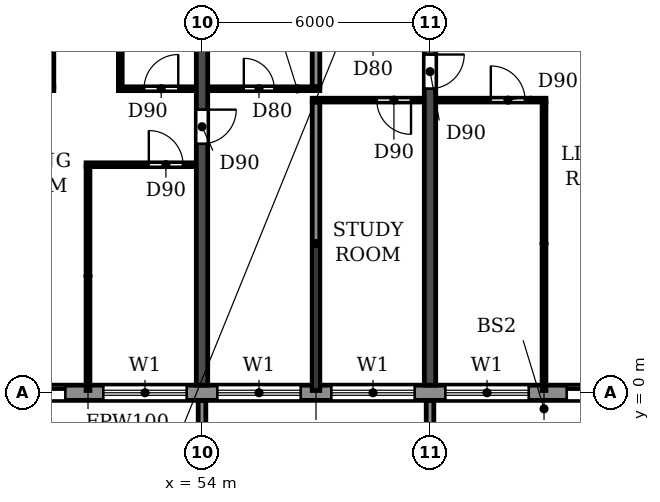
"""IFC4 building model, lengths in metres.
Left out: names, types, materials, properties, quantities, classifications, styles, units other than length and angle.
Written with IfcOpenShell. Run it as: python <this file> out.ifc"""

import sys

from ifc_helpers import new_model, si_unit, direction, frame, frame_2d, origin, place, context, subcontext, project, spatial, polyline, rectangle, outline, extrude, source, transform, mapped, element, fill, save


model = new_model("IFC4")
c1 = context("Model", 3, precision=1e-05, world=origin(), true_north=direction((0.0, 1.0)))
c2 = subcontext(c1, "Body", "Model", "MODEL_VIEW")
j1 = project(units=[si_unit("LENGTHUNIT", "METRE"), si_unit("PLANEANGLEUNIT", "RADIAN")], contexts=[c1])
p1 = place(None, origin())
s1 = spatial("IfcSite", under=j1, at=p1, CompositionType="ELEMENT")
p2 = place(p1, origin())
s2 = spatial("IfcBuilding", under=s1, at=p2, CompositionType="ELEMENT")
p3 = place(p2, frame((0.0, 0.0, 152.1)))
s3 = spatial("IfcBuildingStorey", under=s2, at=p3, CompositionType="ELEMENT", Elevation=152.1)
p4 = place(p3, frame((54.0, 0.2, 0.0), z_axis=(0.0, 0.0, 1.0), x_axis=(0.0, 1.0, 0.0)))
e1 = element("IfcWall", 1, at=p4, inside=s3, PredefinedType="SHEAR", context=c2, shape_type="SweptSolid", body=[
    extrude(rectangle(XDim=11.675, YDim=0.3, at=frame_2d((5.837, 0.0))), origin(), (0.0, 0.0, 1.0), 3.07),
])
p5 = place(p4, frame((6.35, 0.0, 0.0)))
e2 = element("IfcOpeningElement", 2, at=p5, cuts=e1, PredefinedType="OPENING", context=c2, shape_type="SweptSolid", body=[
    extrude(rectangle(XDim=0.9, YDim=2.1, at=frame_2d((0.45, 1.05))), frame((0.0, 0.16, 0.0), z_axis=(0.0, -1.0, 0.0), x_axis=(1.0, 0.0, 0.0)), (0.0, 0.0, 1.0), 0.32),
])
p6 = place(p3, frame((60.0, 0.2, 0.0), z_axis=(0.0, 0.0, 1.0), x_axis=(0.0, 1.0, 0.0)))
e3 = element("IfcWall", 3, at=p6, inside=s3, PredefinedType="SHEAR", context=c2, shape_type="SweptSolid", body=[
    extrude(rectangle(XDim=11.675, YDim=0.3, at=frame_2d((5.837, 0.0))), origin(), (0.0, 0.0, 1.0), 3.07),
])
p7 = place(p6, frame((7.8, 0.0, 0.0)))
e4 = element("IfcOpeningElement", 4, at=p7, cuts=e3, PredefinedType="OPENING", context=c2, shape_type="SweptSolid", body=[
    extrude(rectangle(XDim=0.9, YDim=2.1, at=frame_2d((0.45, 1.05))), frame((0.0, 0.16, 0.0), z_axis=(0.0, -1.0, 0.0), x_axis=(1.0, 0.0, 0.0)), (0.0, 0.0, 1.0), 0.32),
])
p8 = place(p3, frame((16.683, 0.0, 0.0), z_axis=(0.0, 0.0, 1.0), x_axis=(1.0, 0.0, 0.0)))
e5 = element("IfcWall", 5, at=p8, inside=s3, PredefinedType="STANDARD", context=c2, shape_type="SweptSolid", body=[
    extrude(rectangle(XDim=68.634, YDim=0.4, at=frame_2d((34.317, 0.0))), origin(), (0.0, 0.0, 1.0), 3.07),
])
p9 = place(p8, frame((1.717, 0.0, 0.9)))
e6 = element("IfcOpeningElement", 6, at=p9, cuts=e5, PredefinedType="OPENING", context=c2, shape_type="SweptSolid", body=[
    extrude(rectangle(XDim=2.2, YDim=1.5, at=frame_2d((1.1, 0.75))), frame((0.0, 0.21, 0.0), z_axis=(0.0, -1.0, 0.0), x_axis=(1.0, 0.0, 0.0)), (0.0, 0.0, 1.0), 0.42),
])
p10 = place(p8, frame((4.717, 0.0, 0.9)))
e7 = element("IfcOpeningElement", 7, at=p10, cuts=e5, PredefinedType="OPENING", context=c2, shape_type="SweptSolid", body=[
    extrude(rectangle(XDim=2.2, YDim=1.5, at=frame_2d((1.1, 0.75))), frame((0.0, 0.21, 0.0), z_axis=(0.0, -1.0, 0.0), x_axis=(1.0, 0.0, 0.0)), (0.0, 0.0, 1.0), 0.42),
])
p11 = place(p8, frame((7.917, 0.0, 0.0)))
e8 = element("IfcOpeningElement", 8, at=p11, cuts=e5, PredefinedType="OPENING", context=c2, shape_type="SweptSolid", body=[
    extrude(rectangle(XDim=1.8, YDim=2.4, at=frame_2d((0.9, 1.2))), frame((0.0, 0.21, 0.0), z_axis=(0.0, -1.0, 0.0), x_axis=(1.0, 0.0, 0.0)), (0.0, 0.0, 1.0), 0.42),
])
p12 = place(p8, frame((10.717, 0.0, 0.9)))
e9 = element("IfcOpeningElement", 9, at=p12, cuts=e5, PredefinedType="OPENING", context=c2, shape_type="SweptSolid", body=[
    extrude(rectangle(XDim=2.2, YDim=1.5, at=frame_2d((1.1, 0.75))), frame((0.0, 0.21, 0.0), z_axis=(0.0, -1.0, 0.0), x_axis=(1.0, 0.0, 0.0)), (0.0, 0.0, 1.0), 0.42),
])
p13 = place(p8, frame((13.717, 0.0, 0.9)))
e10 = element("IfcOpeningElement", 10, at=p13, cuts=e5, PredefinedType="OPENING", context=c2, shape_type="SweptSolid", body=[
    extrude(rectangle(XDim=2.2, YDim=1.5, at=frame_2d((1.1, 0.75))), frame((0.0, 0.21, 0.0), z_axis=(0.0, -1.0, 0.0), x_axis=(1.0, 0.0, 0.0)), (0.0, 0.0, 1.0), 0.42),
])
p14 = place(p8, frame((16.717, 0.0, 0.9)))
e11 = element("IfcOpeningElement", 11, at=p14, cuts=e5, PredefinedType="OPENING", context=c2, shape_type="SweptSolid", body=[
    extrude(rectangle(XDim=2.2, YDim=1.5, at=frame_2d((1.1, 0.75))), frame((0.0, 0.21, 0.0), z_axis=(0.0, -1.0, 0.0), x_axis=(1.0, 0.0, 0.0)), (0.0, 0.0, 1.0), 0.42),
])
p15 = place(p8, frame((19.717, 0.0, 0.9)))
e12 = element("IfcOpeningElement", 12, at=p15, cuts=e5, PredefinedType="OPENING", context=c2, shape_type="SweptSolid", body=[
    extrude(rectangle(XDim=2.2, YDim=1.5, at=frame_2d((1.1, 0.75))), frame((0.0, 0.21, 0.0), z_axis=(0.0, -1.0, 0.0), x_axis=(1.0, 0.0, 0.0)), (0.0, 0.0, 1.0), 0.42),
])
p16 = place(p8, frame((22.917, 0.0, 0.0)))
e13 = element("IfcOpeningElement", 13, at=p16, cuts=e5, PredefinedType="OPENING", context=c2, shape_type="SweptSolid", body=[
    extrude(rectangle(XDim=1.8, YDim=2.4, at=frame_2d((0.9, 1.2))), frame((0.0, 0.21, 0.0), z_axis=(0.0, -1.0, 0.0), x_axis=(1.0, 0.0, 0.0)), (0.0, 0.0, 1.0), 0.42),
])
p17 = place(p8, frame((25.717, 0.0, 0.9)))
e14 = element("IfcOpeningElement", 14, at=p17, cuts=e5, PredefinedType="OPENING", context=c2, shape_type="SweptSolid", body=[
    extrude(rectangle(XDim=2.2, YDim=1.5, at=frame_2d((1.1, 0.75))), frame((0.0, 0.21, 0.0), z_axis=(0.0, -1.0, 0.0), x_axis=(1.0, 0.0, 0.0)), (0.0, 0.0, 1.0), 0.42),
])
p18 = place(p8, frame((28.717, 0.0, 0.9)))
e15 = element("IfcOpeningElement", 15, at=p18, cuts=e5, PredefinedType="OPENING", context=c2, shape_type="SweptSolid", body=[
    extrude(rectangle(XDim=2.2, YDim=1.5, at=frame_2d((1.1, 0.75))), frame((0.0, 0.21, 0.0), z_axis=(0.0, -1.0, 0.0), x_axis=(1.0, 0.0, 0.0)), (0.0, 0.0, 1.0), 0.42),
])
p19 = place(p8, frame((31.917, 0.0, 0.0)))
e16 = element("IfcOpeningElement", 16, at=p19, cuts=e5, PredefinedType="OPENING", context=c2, shape_type="SweptSolid", body=[
    extrude(rectangle(XDim=1.8, YDim=2.4, at=frame_2d((0.9, 1.2))), frame((0.0, 0.21, 0.0), z_axis=(0.0, -1.0, 0.0), x_axis=(1.0, 0.0, 0.0)), (0.0, 0.0, 1.0), 0.42),
])
p20 = place(p8, frame((34.717, 0.0, 0.9)))
e17 = element("IfcOpeningElement", 17, at=p20, cuts=e5, PredefinedType="OPENING", context=c2, shape_type="SweptSolid", body=[
    extrude(rectangle(XDim=2.2, YDim=1.5, at=frame_2d((1.1, 0.75))), frame((0.0, 0.21, 0.0), z_axis=(0.0, -1.0, 0.0), x_axis=(1.0, 0.0, 0.0)), (0.0, 0.0, 1.0), 0.42),
])
p21 = place(p8, frame((37.717, 0.0, 0.9)))
e18 = element("IfcOpeningElement", 18, at=p21, cuts=e5, PredefinedType="OPENING", context=c2, shape_type="SweptSolid", body=[
    extrude(rectangle(XDim=2.2, YDim=1.5, at=frame_2d((1.1, 0.75))), frame((0.0, 0.21, 0.0), z_axis=(0.0, -1.0, 0.0), x_axis=(1.0, 0.0, 0.0)), (0.0, 0.0, 1.0), 0.42),
])
p22 = place(p8, frame((40.717, 0.0, 0.9)))
e19 = element("IfcOpeningElement", 19, at=p22, cuts=e5, PredefinedType="OPENING", context=c2, shape_type="SweptSolid", body=[
    extrude(rectangle(XDim=2.2, YDim=1.5, at=frame_2d((1.1, 0.75))), frame((0.0, 0.21, 0.0), z_axis=(0.0, -1.0, 0.0), x_axis=(1.0, 0.0, 0.0)), (0.0, 0.0, 1.0), 0.42),
])
p23 = place(p8, frame((43.717, 0.0, 0.9)))
e20 = element("IfcOpeningElement", 20, at=p23, cuts=e5, PredefinedType="OPENING", context=c2, shape_type="SweptSolid", body=[
    extrude(rectangle(XDim=2.2, YDim=1.5, at=frame_2d((1.1, 0.75))), frame((0.0, 0.21, 0.0), z_axis=(0.0, -1.0, 0.0), x_axis=(1.0, 0.0, 0.0)), (0.0, 0.0, 1.0), 0.42),
])
p24 = place(p8, frame((46.917, 0.0, 0.0)))
e21 = element("IfcOpeningElement", 21, at=p24, cuts=e5, PredefinedType="OPENING", context=c2, shape_type="SweptSolid", body=[
    extrude(rectangle(XDim=1.8, YDim=2.4, at=frame_2d((0.9, 1.2))), frame((0.0, 0.21, 0.0), z_axis=(0.0, -1.0, 0.0), x_axis=(1.0, 0.0, 0.0)), (0.0, 0.0, 1.0), 0.42),
])
p25 = place(p8, frame((49.717, 0.0, 0.9)))
e22 = element("IfcOpeningElement", 22, at=p25, cuts=e5, PredefinedType="OPENING", context=c2, shape_type="SweptSolid", body=[
    extrude(rectangle(XDim=2.2, YDim=1.5, at=frame_2d((1.1, 0.75))), frame((0.0, 0.21, 0.0), z_axis=(0.0, -1.0, 0.0), x_axis=(1.0, 0.0, 0.0)), (0.0, 0.0, 1.0), 0.42),
])
p26 = place(p8, frame((52.717, 0.0, 0.9)))
e23 = element("IfcOpeningElement", 23, at=p26, cuts=e5, PredefinedType="OPENING", context=c2, shape_type="SweptSolid", body=[
    extrude(rectangle(XDim=2.2, YDim=1.5, at=frame_2d((1.1, 0.75))), frame((0.0, 0.21, 0.0), z_axis=(0.0, -1.0, 0.0), x_axis=(1.0, 0.0, 0.0)), (0.0, 0.0, 1.0), 0.42),
])
p27 = place(p8, frame((55.717, 0.0, 0.9)))
e24 = element("IfcOpeningElement", 24, at=p27, cuts=e5, PredefinedType="OPENING", context=c2, shape_type="SweptSolid", body=[
    extrude(rectangle(XDim=2.2, YDim=1.5, at=frame_2d((1.1, 0.75))), frame((0.0, 0.21, 0.0), z_axis=(0.0, -1.0, 0.0), x_axis=(1.0, 0.0, 0.0)), (0.0, 0.0, 1.0), 0.42),
])
p28 = place(p8, frame((58.917, 0.0, 0.0)))
e25 = element("IfcOpeningElement", 25, at=p28, cuts=e5, PredefinedType="OPENING", context=c2, shape_type="SweptSolid", body=[
    extrude(rectangle(XDim=1.8, YDim=2.4, at=frame_2d((0.9, 1.2))), frame((0.0, 0.21, 0.0), z_axis=(0.0, -1.0, 0.0), x_axis=(1.0, 0.0, 0.0)), (0.0, 0.0, 1.0), 0.42),
])
p29 = place(p8, frame((61.717, 0.0, 0.9)))
e26 = element("IfcOpeningElement", 26, at=p29, cuts=e5, PredefinedType="OPENING", context=c2, shape_type="SweptSolid", body=[
    extrude(rectangle(XDim=2.2, YDim=1.5, at=frame_2d((1.1, 0.75))), frame((0.0, 0.21, 0.0), z_axis=(0.0, -1.0, 0.0), x_axis=(1.0, 0.0, 0.0)), (0.0, 0.0, 1.0), 0.42),
])
p30 = place(p8, frame((64.717, 0.0, 0.9)))
e27 = element("IfcOpeningElement", 27, at=p30, cuts=e5, PredefinedType="OPENING", context=c2, shape_type="SweptSolid", body=[
    extrude(rectangle(XDim=2.2, YDim=1.5, at=frame_2d((1.1, 0.75))), frame((0.0, 0.21, 0.0), z_axis=(0.0, -1.0, 0.0), x_axis=(1.0, 0.0, 0.0)), (0.0, 0.0, 1.0), 0.42),
])
m1 = source(origin(), c2, "Body", "SweptSolid", [
    extrude(outline(polyline([(0.0, 0.0), (0.2, 0.0), (0.2, 1.65), (0.0, 1.65), (0.0, 0.0)])), origin(), (0.0, 0.0, 1.0), 3.1),
])
for number, where in (
    (28, (53.9, -1.85, 0.0)),
    (29, (59.9, -1.85, 0.0)),
):
    element("IfcWall", number, at=place(p3, frame(where)), inside=s3, PredefinedType="STANDARD", context=c2, shape_type="MappedRepresentation", body=[
        mapped(m1, transform((0.0, 0.0, 0.0))),
    ])
p31 = place(p3, frame((57.0, 0.06, 0.0), z_axis=(0.0, 0.0, 1.0), x_axis=(0.0, 1.0, 0.0)))
e30 = element("IfcWall", 30, at=p31, inside=s3, PredefinedType="PARTITIONING", context=c2, shape_type="SweptSolid", body=[
    extrude(rectangle(XDim=7.59, YDim=0.2, at=frame_2d((3.795, 0.0))), origin(), (0.0, 0.0, 1.0), 3.07),
])
p32 = place(p3, frame((57.0, 8.05, 0.0), z_axis=(0.0, 0.0, 1.0), x_axis=(0.0, 1.0, 0.0)))
e31 = element("IfcWall", 31, at=p32, inside=s3, PredefinedType="PARTITIONING", context=c2, shape_type="SweptSolid", body=[
    extrude(rectangle(XDim=3.815, YDim=0.2, at=frame_2d((1.907, 0.0))), origin(), (0.0, 0.0, 1.0), 3.07),
])
p33 = place(p3, frame((50.95, 6.0, 0.0), z_axis=(0.0, 0.0, 1.0), x_axis=(1.0, 0.0, 0.0)))
e32 = element("IfcWall", 32, at=p33, inside=s3, PredefinedType="PARTITIONING", context=c2, shape_type="SweptSolid", body=[
    extrude(rectangle(XDim=2.89, YDim=0.1, at=frame_2d((1.445, 0.0))), origin(), (0.0, 0.0, 1.0), 3.07),
])
p34 = place(p33, frame((1.65, 0.0, 0.0)))
e33 = element("IfcOpeningElement", 33, at=p34, cuts=e32, PredefinedType="OPENING", context=c2, shape_type="SweptSolid", body=[
    extrude(rectangle(XDim=0.9, YDim=2.1, at=frame_2d((0.45, 1.05))), frame((0.0, 0.06, 0.0), z_axis=(0.0, -1.0, 0.0), x_axis=(1.0, 0.0, 0.0)), (0.0, 0.0, 1.0), 0.12),
])
p35 = place(p3, frame((56.9, 7.7, 0.0), z_axis=(0.0, 0.0, 1.0), x_axis=(1.0, 0.0, 0.0)))
e34 = element("IfcWall", 34, at=p35, inside=s3, PredefinedType="PARTITIONING", context=c2, shape_type="SweptSolid", body=[
    extrude(rectangle(XDim=2.94, YDim=0.1, at=frame_2d((1.47, 0.0))), origin(), (0.0, 0.0, 1.0), 3.07),
])
p36 = place(p35, frame((1.7, 0.0, 0.0)))
e35 = element("IfcOpeningElement", 35, at=p36, cuts=e34, PredefinedType="OPENING", context=c2, shape_type="SweptSolid", body=[
    extrude(rectangle(XDim=0.9, YDim=2.1, at=frame_2d((0.45, 1.05))), frame((0.0, 0.06, 0.0), z_axis=(0.0, -1.0, 0.0), x_axis=(1.0, 0.0, 0.0)), (0.0, 0.0, 1.0), 0.12),
])
p37 = place(p3, frame((60.16, 7.7, 0.0), z_axis=(0.0, 0.0, 1.0), x_axis=(1.0, 0.0, 0.0)))
e36 = element("IfcWall", 36, at=p37, inside=s3, PredefinedType="PARTITIONING", context=c2, shape_type="SweptSolid", body=[
    extrude(rectangle(XDim=2.89, YDim=0.1, at=frame_2d((1.445, 0.0))), origin(), (0.0, 0.0, 1.0), 3.07),
])
p38 = place(p37, frame((1.44, 0.0, 0.0)))
e37 = element("IfcOpeningElement", 37, at=p38, cuts=e36, PredefinedType="OPENING", context=c2, shape_type="SweptSolid", body=[
    extrude(rectangle(XDim=0.9, YDim=2.1, at=frame_2d((0.45, 1.05))), frame((0.0, 0.06, 0.0), z_axis=(0.0, -1.0, 0.0), x_axis=(1.0, 0.0, 0.0)), (0.0, 0.0, 1.0), 0.12),
])
p39 = place(p3, frame((48.16, 8.0, 0.0), z_axis=(0.0, 0.0, 1.0), x_axis=(1.0, 0.0, 0.0)))
e38 = element("IfcWall", 38, at=p39, inside=s3, PredefinedType="PARTITIONING", context=c2, shape_type="SweptSolid", body=[
    extrude(rectangle(XDim=1.94, YDim=0.1, at=frame_2d((0.97, 0.0))), origin(), (0.0, 0.0, 1.0), 3.07),
])
p40 = place(p39, frame((0.465, 0.0, 0.0)))
e39 = element("IfcOpeningElement", 39, at=p40, cuts=e38, PredefinedType="OPENING", context=c2, shape_type="SweptSolid", body=[
    extrude(rectangle(XDim=0.8, YDim=2.1, at=frame_2d((0.4, 1.05))), frame((0.0, 0.06, 0.0), z_axis=(0.0, -1.0, 0.0), x_axis=(1.0, 0.0, 0.0)), (0.0, 0.0, 1.0), 0.12),
])
p41 = place(p3, frame((51.8, 8.0, 0.0), z_axis=(0.0, 0.0, 1.0), x_axis=(1.0, 0.0, 0.0)))
e40 = element("IfcWall", 40, at=p41, inside=s3, PredefinedType="PARTITIONING", context=c2, shape_type="SweptSolid", body=[
    extrude(rectangle(XDim=2.04, YDim=0.1, at=frame_2d((1.02, 0.0))), origin(), (0.0, 0.0, 1.0), 3.07),
])
p42 = place(p41, frame((0.675, 0.0, 0.0)))
e41 = element("IfcOpeningElement", 41, at=p42, cuts=e40, PredefinedType="OPENING", context=c2, shape_type="SweptSolid", body=[
    extrude(rectangle(XDim=0.9, YDim=2.1, at=frame_2d((0.45, 1.05))), frame((0.0, 0.06, 0.0), z_axis=(0.0, -1.0, 0.0), x_axis=(1.0, 0.0, 0.0)), (0.0, 0.0, 1.0), 0.12),
])
p43 = place(p3, frame((54.16, 8.0, 0.0), z_axis=(0.0, 0.0, 1.0), x_axis=(1.0, 0.0, 0.0)))
e42 = element("IfcWall", 42, at=p43, inside=s3, PredefinedType="PARTITIONING", context=c2, shape_type="SweptSolid", body=[
    extrude(rectangle(XDim=2.94, YDim=0.1, at=frame_2d((1.47, 0.0))), origin(), (0.0, 0.0, 1.0), 3.07),
])
p44 = place(p43, frame((0.94, 0.0, 0.0)))
e43 = element("IfcOpeningElement", 43, at=p44, cuts=e42, PredefinedType="OPENING", context=c2, shape_type="SweptSolid", body=[
    extrude(rectangle(XDim=0.8, YDim=2.1, at=frame_2d((0.4, 1.05))), frame((0.0, 0.06, 0.0), z_axis=(0.0, -1.0, 0.0), x_axis=(1.0, 0.0, 0.0)), (0.0, 0.0, 1.0), 0.12),
])
p45 = place(p3, frame((50.05, 8.05, 0.0), z_axis=(0.0, 0.0, 1.0), x_axis=(0.0, 1.0, 0.0)))
e44 = element("IfcWall", 44, at=p45, inside=s3, PredefinedType="PARTITIONING", context=c2, shape_type="SweptSolid", body=[
    extrude(rectangle(XDim=3.815, YDim=0.1, at=frame_2d((1.907, 0.0))), origin(), (0.0, 0.0, 1.0), 3.07),
])
p46 = place(p3, frame((51.0, 0.06, 0.0), z_axis=(0.0, 0.0, 1.0), x_axis=(0.0, 1.0, 0.0)))
e45 = element("IfcWall", 45, at=p46, inside=s3, PredefinedType="PARTITIONING", context=c2, shape_type="SweptSolid", body=[
    extrude(rectangle(XDim=5.89, YDim=0.1, at=frame_2d((2.945, 0.0))), origin(), (0.0, 0.0, 1.0), 3.07),
])
p47 = place(p3, frame((51.85, 8.05, 0.0), z_axis=(0.0, 0.0, 1.0), x_axis=(0.0, 1.0, 0.0)))
e46 = element("IfcWall", 46, at=p47, inside=s3, PredefinedType="PARTITIONING", context=c2, shape_type="SweptSolid", body=[
    extrude(rectangle(XDim=3.815, YDim=0.1, at=frame_2d((1.907, 0.0))), origin(), (0.0, 0.0, 1.0), 3.07),
])
p48 = place(p3, frame((63.0, 0.06, 0.0), z_axis=(0.0, 0.0, 1.0), x_axis=(0.0, 1.0, 0.0)))
e47 = element("IfcWall", 47, at=p48, inside=s3, PredefinedType="PARTITIONING", context=c2, shape_type="SweptSolid", body=[
    extrude(rectangle(XDim=7.59, YDim=0.1, at=frame_2d((3.795, 0.0))), origin(), (0.0, 0.0, 1.0), 3.07),
])
p49 = place(p19, origin())
e48 = element("IfcDoor", 48, at=p49, inside=s3, OperationType="DOUBLE_DOOR_SLIDING", PredefinedType="DOOR", context=c2, shape_type="SweptSolid", body=[
    extrude(rectangle(XDim=1.8, YDim=2.4, at=frame_2d((0.9, 1.2))), frame((0.0, 0.025, 0.0), z_axis=(0.0, -1.0, 0.0), x_axis=(1.0, 0.0, 0.0)), (0.0, 0.0, 1.0), 0.05),
])
fill(e16, e48)
p50 = place(p20, origin())
e49 = element("IfcWindow", 49, at=p50, inside=s3, PartitioningType="DOUBLE_PANEL_HORIZONTAL", PredefinedType="WINDOW", context=c2, shape_type="SweptSolid", body=[
    extrude(rectangle(XDim=2.2, YDim=1.5, at=frame_2d((1.1, 0.75))), frame((0.0, 0.03, 0.0), z_axis=(0.0, -1.0, 0.0), x_axis=(1.0, 0.0, 0.0)), (0.0, 0.0, 1.0), 0.06),
])
fill(e17, e49)
p51 = place(p21, origin())
e50 = element("IfcWindow", 50, at=p51, inside=s3, PartitioningType="DOUBLE_PANEL_HORIZONTAL", PredefinedType="WINDOW", context=c2, shape_type="SweptSolid", body=[
    extrude(rectangle(XDim=2.2, YDim=1.5, at=frame_2d((1.1, 0.75))), frame((0.0, 0.03, 0.0), z_axis=(0.0, -1.0, 0.0), x_axis=(1.0, 0.0, 0.0)), (0.0, 0.0, 1.0), 0.06),
])
fill(e18, e50)
p52 = place(p22, origin())
e51 = element("IfcWindow", 51, at=p52, inside=s3, PartitioningType="DOUBLE_PANEL_HORIZONTAL", PredefinedType="WINDOW", context=c2, shape_type="SweptSolid", body=[
    extrude(rectangle(XDim=2.2, YDim=1.5, at=frame_2d((1.1, 0.75))), frame((0.0, 0.03, 0.0), z_axis=(0.0, -1.0, 0.0), x_axis=(1.0, 0.0, 0.0)), (0.0, 0.0, 1.0), 0.06),
])
fill(e19, e51)
p53 = place(p23, origin())
e52 = element("IfcWindow", 52, at=p53, inside=s3, PartitioningType="DOUBLE_PANEL_HORIZONTAL", PredefinedType="WINDOW", context=c2, shape_type="SweptSolid", body=[
    extrude(rectangle(XDim=2.2, YDim=1.5, at=frame_2d((1.1, 0.75))), frame((0.0, 0.03, 0.0), z_axis=(0.0, -1.0, 0.0), x_axis=(1.0, 0.0, 0.0)), (0.0, 0.0, 1.0), 0.06),
])
fill(e20, e52)
p54 = place(p24, origin())
e53 = element("IfcDoor", 53, at=p54, inside=s3, OperationType="DOUBLE_DOOR_SLIDING", PredefinedType="DOOR", context=c2, shape_type="SweptSolid", body=[
    extrude(rectangle(XDim=1.8, YDim=2.4, at=frame_2d((0.9, 1.2))), frame((0.0, 0.025, 0.0), z_axis=(0.0, -1.0, 0.0), x_axis=(1.0, 0.0, 0.0)), (0.0, 0.0, 1.0), 0.05),
])
fill(e21, e53)
p55 = place(p44, origin())
e54 = element("IfcDoor", 54, at=p55, inside=s3, OperationType="SINGLE_SWING_LEFT", PredefinedType="DOOR", context=c2, shape_type="SweptSolid", body=[
    extrude(rectangle(XDim=0.8, YDim=2.1, at=frame_2d((0.4, 1.05))), frame((0.0, 0.025, 0.0), z_axis=(0.0, -1.0, 0.0), x_axis=(1.0, 0.0, 0.0)), (0.0, 0.0, 1.0), 0.05),
])
fill(e43, e54)
p56 = place(p42, origin())
e55 = element("IfcDoor", 55, at=p56, inside=s3, OperationType="SINGLE_SWING_RIGHT", PredefinedType="DOOR", context=c2, shape_type="SweptSolid", body=[
    extrude(rectangle(XDim=0.9, YDim=2.1, at=frame_2d((0.45, 1.05))), frame((0.0, 0.025, 0.0), z_axis=(0.0, -1.0, 0.0), x_axis=(1.0, 0.0, 0.0)), (0.0, 0.0, 1.0), 0.05),
])
fill(e41, e55)
p57 = place(p34, origin())
e56 = element("IfcDoor", 56, at=p57, inside=s3, OperationType="SINGLE_SWING_LEFT", PredefinedType="DOOR", context=c2, shape_type="SweptSolid", body=[
    extrude(rectangle(XDim=0.9, YDim=2.1, at=frame_2d((0.45, 1.05))), frame((0.0, 0.025, 0.0), z_axis=(0.0, -1.0, 0.0), x_axis=(1.0, 0.0, 0.0)), (0.0, 0.0, 1.0), 0.05),
])
fill(e33, e56)
p58 = place(p5, frame((0.9, 0.0, 0.0), z_axis=(0.0, 0.0, 1.0), x_axis=(-1.0, 0.0, 0.0)))
e57 = element("IfcDoor", 57, at=p58, inside=s3, OperationType="SINGLE_SWING_LEFT", PredefinedType="DOOR", context=c2, shape_type="SweptSolid", body=[
    extrude(rectangle(XDim=0.9, YDim=2.1, at=frame_2d((0.45, 1.05))), frame((0.0, 0.025, 0.0), z_axis=(0.0, -1.0, 0.0), x_axis=(1.0, 0.0, 0.0)), (0.0, 0.0, 1.0), 0.05),
])
fill(e2, e57)
p59 = place(p36, frame((0.9, 0.0, 0.0), z_axis=(0.0, 0.0, 1.0), x_axis=(-1.0, 0.0, 0.0)))
e58 = element("IfcDoor", 58, at=p59, inside=s3, OperationType="SINGLE_SWING_LEFT", PredefinedType="DOOR", context=c2, shape_type="SweptSolid", body=[
    extrude(rectangle(XDim=0.9, YDim=2.1, at=frame_2d((0.45, 1.05))), frame((0.0, 0.025, 0.0), z_axis=(0.0, -1.0, 0.0), x_axis=(1.0, 0.0, 0.0)), (0.0, 0.0, 1.0), 0.05),
])
fill(e35, e58)
p60 = place(p7, frame((0.9, 0.0, 0.0), z_axis=(0.0, 0.0, 1.0), x_axis=(-1.0, 0.0, 0.0)))
e59 = element("IfcDoor", 59, at=p60, inside=s3, OperationType="SINGLE_SWING_LEFT", PredefinedType="DOOR", context=c2, shape_type="SweptSolid", body=[
    extrude(rectangle(XDim=0.9, YDim=2.1, at=frame_2d((0.45, 1.05))), frame((0.0, 0.025, 0.0), z_axis=(0.0, -1.0, 0.0), x_axis=(1.0, 0.0, 0.0)), (0.0, 0.0, 1.0), 0.05),
])
fill(e4, e59)
p61 = place(p38, origin())
e60 = element("IfcDoor", 60, at=p61, inside=s3, OperationType="SINGLE_SWING_LEFT", PredefinedType="DOOR", context=c2, shape_type="SweptSolid", body=[
    extrude(rectangle(XDim=0.9, YDim=2.1, at=frame_2d((0.45, 1.05))), frame((0.0, 0.025, 0.0), z_axis=(0.0, -1.0, 0.0), x_axis=(1.0, 0.0, 0.0)), (0.0, 0.0, 1.0), 0.05),
])
fill(e37, e60)
save(model, sys.argv[1])
